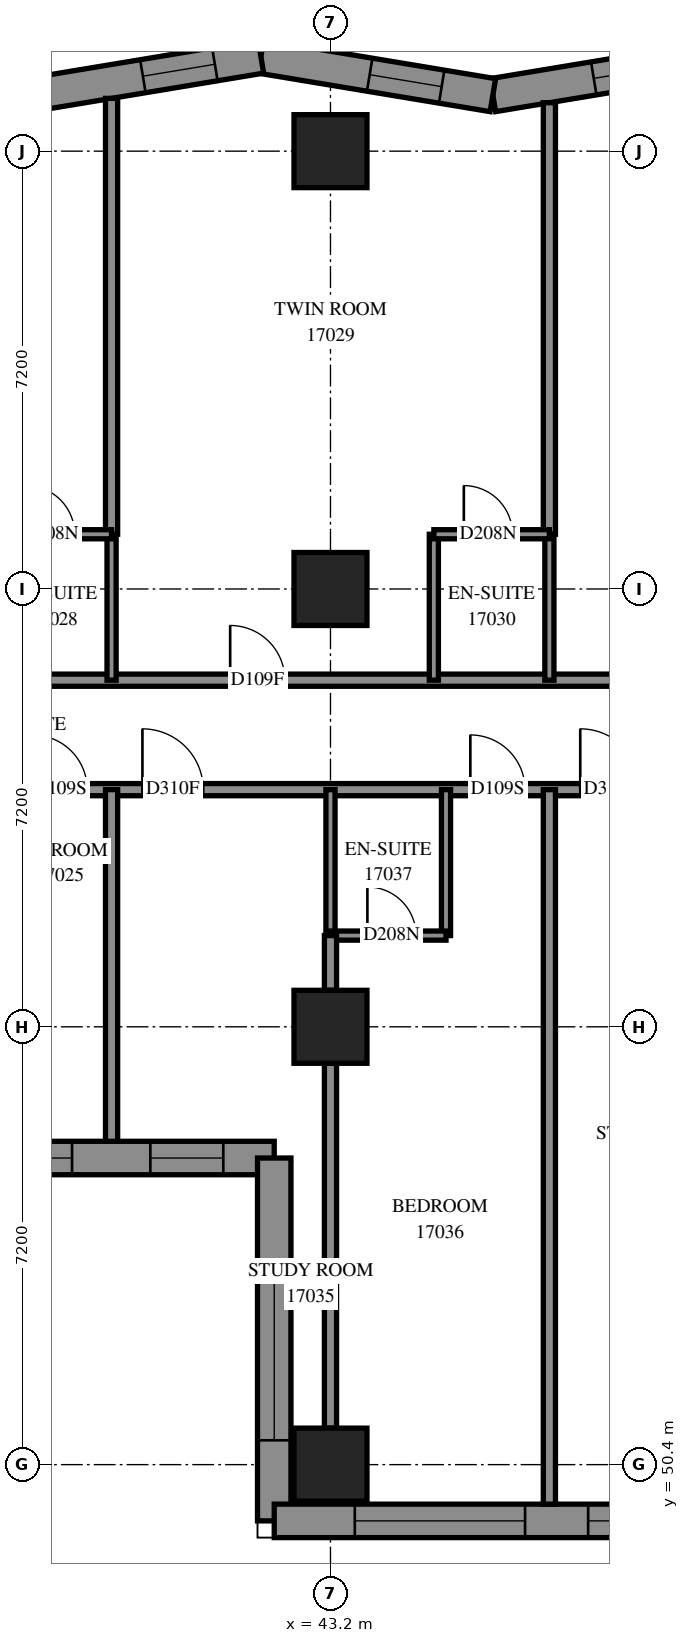
"""IFC4 building model, lengths in metres.
Left out: names, types, materials, properties, quantities, classifications, styles, units other than length and angle.
Written with IfcOpenShell. Run it as: python <this file> out.ifc"""

import sys

from ifc_helpers import new_model, si_unit, direction, frame, frame_2d, origin, origin_2d, place, context, subcontext, project, spatial, polyline, rectangle, outline, extrude, element, fill, save


model = new_model("IFC4")
c1 = context("Model", 3, precision=1e-05, world=origin(), true_north=direction((0.0, 1.0)))
c2 = subcontext(c1, "Body", "Model", "MODEL_VIEW")
j1 = project(units=[si_unit("LENGTHUNIT", "METRE"), si_unit("PLANEANGLEUNIT", "RADIAN")], contexts=[c1])
p1 = place(None, origin())
s1 = spatial("IfcSite", under=j1, at=p1, CompositionType="ELEMENT")
p2 = place(p1, origin())
s2 = spatial("IfcBuilding", under=s1, at=p2, CompositionType="ELEMENT")
p3 = place(p2, frame((0.0, 0.0, 64.4)))
s3 = spatial("IfcBuildingStorey", under=s2, at=p3, CompositionType="ELEMENT", Elevation=64.4)
for number, where, z_axis, x_axis in (
    (1, (43.2, 50.4, 0.0), (0.0, 0.0, 1.0), (1.0, 0.0, 0.0)),
    (2, (43.2, 57.6, 0.0), (0.0, 0.0, 1.0), (1.0, 0.0, 0.0)),
    (3, (43.2, 64.8, 0.0), (0.0, 0.0, 1.0), (1.0, 0.0, 0.0)),
    (4, (43.2, 72.0, 0.0), (0.0, 0.0, 1.0), (1.0, 0.0, 0.0)),
):
    element("IfcColumn", number, at=place(p3, frame(where, z_axis=z_axis, x_axis=x_axis)), inside=s3, PredefinedType="COLUMN", context=c2, shape_type="SweptSolid", body=[
        extrude(rectangle(XDim=1.2, YDim=1.2, at=origin_2d()), origin(), (0.0, 0.0, 1.0), 3.1),
    ])
p4 = place(p3, frame((49.685, 73.554, 0.0), z_axis=(0.0, 0.0, 1.0), x_axis=(-0.9865110911, -0.1636944324, 0.0)))
e5 = element("IfcWall", 5, at=p4, inside=s3, PredefinedType="SOLIDWALL", context=c2, shape_type="SweptSolid", body=[
    extrude(outline(polyline([(-0.046, -0.275), (3.821, -0.275), (3.913, 0.275), (0.046, 0.275), (-0.046, -0.275)])), origin(), (0.0, 0.0, 1.0), 3.1),
])
p5 = place(p4, frame((0.985, 0.0, 0.5)))
e6 = element("IfcOpeningElement", 6, at=p5, cuts=e5, PredefinedType="OPENING", context=c2, shape_type="SweptSolid", body=[
    extrude(rectangle(XDim=1.2, YDim=2.45, at=frame_2d((0.6, 1.225))), frame((0.0, 0.285, 0.0), z_axis=(0.0, -1.0, 0.0), x_axis=(1.0, 0.0, 0.0)), (0.0, 0.0, 1.0), 0.57),
])
p6 = place(p3, frame((45.87, 72.921, 0.0), z_axis=(0.0, 0.0, 1.0), x_axis=(-0.9865110911, 0.1636944324, 0.0)))
e7 = element("IfcWall", 7, at=p6, inside=s3, PredefinedType="SOLIDWALL", context=c2, shape_type="SweptSolid", body=[
    extrude(outline(polyline([(0.046, -0.275), (3.913, -0.275), (3.821, 0.275), (-0.046, 0.275), (0.046, -0.275)])), origin(), (0.0, 0.0, 1.0), 3.1),
])
p7 = place(p6, frame((0.854, 0.0, 0.5)))
e8 = element("IfcOpeningElement", 8, at=p7, cuts=e7, PredefinedType="OPENING", context=c2, shape_type="SweptSolid", body=[
    extrude(rectangle(XDim=1.2, YDim=2.45, at=frame_2d((0.6, 1.225))), frame((0.0, 0.285, 0.0), z_axis=(0.0, -1.0, 0.0), x_axis=(1.0, 0.0, 0.0)), (0.0, 0.0, 1.0), 0.57),
])
p8 = place(p3, frame((42.056, 73.554, 0.0), z_axis=(0.0, 0.0, 1.0), x_axis=(-0.9865110911, -0.1636944324, 0.0)))
e9 = element("IfcWall", 9, at=p8, inside=s3, PredefinedType="SOLIDWALL", context=c2, shape_type="SweptSolid", body=[
    extrude(outline(polyline([(-0.046, -0.275), (3.821, -0.275), (3.913, 0.275), (0.046, 0.275), (-0.046, -0.275)])), origin(), (0.0, 0.0, 1.0), 3.1),
])
p9 = place(p8, frame((0.767, 0.0, 0.5)))
e10 = element("IfcOpeningElement", 10, at=p9, cuts=e9, PredefinedType="OPENING", context=c2, shape_type="SweptSolid", body=[
    extrude(rectangle(XDim=1.2, YDim=2.45, at=frame_2d((0.6, 1.225))), frame((0.0, 0.285, 0.0), z_axis=(0.0, -1.0, 0.0), x_axis=(1.0, 0.0, 0.0)), (0.0, 0.0, 1.0), 0.57),
])
p10 = place(p3, frame((27.875, 55.442, 0.0), z_axis=(0.0, 0.0, 1.0), x_axis=(1.0, 0.0, 0.0)))
e11 = element("IfcWall", 11, at=p10, inside=s3, PredefinedType="SOLIDWALL", context=c2, shape_type="SweptSolid", body=[
    extrude(outline(polyline([(-0.275, -0.275), (14.125, -0.275), (14.675, 0.275), (0.275, 0.275), (-0.275, -0.275)])), origin(), (0.0, 0.0, 1.0), 3.1),
])
p11 = place(p10, frame((1.325, 0.0, 0.5)))
e12 = element("IfcOpeningElement", 12, at=p11, cuts=e11, PredefinedType="OPENING", context=c2, shape_type="SweptSolid", body=[
    extrude(rectangle(XDim=2.8, YDim=2.45, at=frame_2d((1.4, 1.225))), frame((0.0, 0.285, 0.0), z_axis=(0.0, -1.0, 0.0), x_axis=(1.0, 0.0, 0.0)), (0.0, 0.0, 1.0), 0.57),
])
p12 = place(p10, frame((4.925, 0.0, 0.5)))
e13 = element("IfcOpeningElement", 13, at=p12, cuts=e11, PredefinedType="OPENING", context=c2, shape_type="SweptSolid", body=[
    extrude(rectangle(XDim=2.8, YDim=2.45, at=frame_2d((1.4, 1.225))), frame((0.0, 0.285, 0.0), z_axis=(0.0, -1.0, 0.0), x_axis=(1.0, 0.0, 0.0)), (0.0, 0.0, 1.0), 0.57),
])
p13 = place(p10, frame((8.275, 0.0, 0.5)))
e14 = element("IfcOpeningElement", 14, at=p13, cuts=e11, PredefinedType="OPENING", context=c2, shape_type="SweptSolid", body=[
    extrude(rectangle(XDim=2.8, YDim=2.45, at=frame_2d((1.4, 1.225))), frame((0.0, 0.285, 0.0), z_axis=(0.0, -1.0, 0.0), x_axis=(1.0, 0.0, 0.0)), (0.0, 0.0, 1.0), 0.57),
])
p14 = place(p10, frame((12.363, 0.0, 0.5)))
e15 = element("IfcOpeningElement", 15, at=p14, cuts=e11, PredefinedType="OPENING", context=c2, shape_type="SweptSolid", body=[
    extrude(rectangle(XDim=1.2, YDim=2.45, at=frame_2d((0.6, 1.225))), frame((0.0, 0.285, 0.0), z_axis=(0.0, -1.0, 0.0), x_axis=(1.0, 0.0, 0.0)), (0.0, 0.0, 1.0), 0.57),
])
p15 = place(p3, frame((42.275, 55.442, 0.0), z_axis=(0.0, 0.0, 1.0), x_axis=(0.0, -1.0, 0.0)))
e16 = element("IfcWall", 16, at=p15, inside=s3, PredefinedType="SOLIDWALL", context=c2, shape_type="SweptSolid", body=[
    extrude(outline(polyline([(0.275, -0.275), (6.242, -0.275), (5.692, 0.275), (-0.275, 0.275), (0.275, -0.275)])), origin(), (0.0, 0.0, 1.0), 3.1),
])
p16 = place(p15, frame((1.842, 0.0, 0.5)))
e17 = element("IfcOpeningElement", 17, at=p16, cuts=e16, PredefinedType="OPENING", context=c2, shape_type="SweptSolid", body=[
    extrude(rectangle(XDim=2.8, YDim=2.45, at=frame_2d((1.4, 1.225))), frame((0.0, 0.285, 0.0), z_axis=(0.0, -1.0, 0.0), x_axis=(1.0, 0.0, 0.0)), (0.0, 0.0, 1.0), 0.57),
])
p17 = place(p3, frame((42.275, 49.475, 0.0), z_axis=(0.0, 0.0, 1.0), x_axis=(1.0, 0.0, 0.0)))
e18 = element("IfcWall", 18, at=p17, inside=s3, PredefinedType="SOLIDWALL", context=c2, shape_type="SweptSolid", body=[
    extrude(outline(polyline([(-0.275, -0.275), (6.925, -0.275), (7.475, 0.275), (0.275, 0.275), (-0.275, -0.275)])), origin(), (0.0, 0.0, 1.0), 3.1),
])
p18 = place(p17, frame((1.325, 0.0, 0.5)))
e19 = element("IfcOpeningElement", 19, at=p18, cuts=e18, PredefinedType="OPENING", context=c2, shape_type="SweptSolid", body=[
    extrude(rectangle(XDim=2.8, YDim=2.45, at=frame_2d((1.4, 1.225))), frame((0.0, 0.285, 0.0), z_axis=(0.0, -1.0, 0.0), x_axis=(1.0, 0.0, 0.0)), (0.0, 0.0, 1.0), 0.57),
])
p19 = place(p17, frame((5.162, 0.0, 0.5)))
e20 = element("IfcOpeningElement", 20, at=p19, cuts=e18, PredefinedType="OPENING", context=c2, shape_type="SweptSolid", body=[
    extrude(rectangle(XDim=1.2, YDim=2.45, at=frame_2d((0.6, 1.225))), frame((0.0, 0.285, 0.0), z_axis=(0.0, -1.0, 0.0), x_axis=(1.0, 0.0, 0.0)), (0.0, 0.0, 1.0), 0.57),
])
p20 = place(p3, frame((28.8, 61.5, 0.0), z_axis=(0.0, 0.0, 1.0), x_axis=(1.0, 0.0, 0.0)))
e21 = element("IfcWall", 21, at=p20, inside=s3, PredefinedType="PARTITIONING", context=c2, shape_type="SweptSolid", body=[
    extrude(rectangle(XDim=24.3, YDim=0.2, at=frame_2d((12.15, 0.0))), origin(), (0.0, 0.0, 1.0), 3.1),
])
p21 = place(p20, frame((3.899, 0.0, 0.0)))
e22 = element("IfcOpeningElement", 22, at=p21, cuts=e21, PredefinedType="OPENING", context=c2, shape_type="SweptSolid", body=[
    extrude(rectangle(XDim=0.9, YDim=2.1, at=frame_2d((0.45, 1.05))), frame((0.0, 0.11, 0.0), z_axis=(0.0, -1.0, 0.0), x_axis=(1.0, 0.0, 0.0)), (0.0, 0.0, 1.0), 0.22),
])
p22 = place(p20, frame((9.5, 0.0, 0.0)))
e23 = element("IfcOpeningElement", 23, at=p22, cuts=e21, PredefinedType="OPENING", context=c2, shape_type="SweptSolid", body=[
    extrude(rectangle(XDim=0.9, YDim=2.1, at=frame_2d((0.45, 1.05))), frame((0.0, 0.11, 0.0), z_axis=(0.0, -1.0, 0.0), x_axis=(1.0, 0.0, 0.0)), (0.0, 0.0, 1.0), 0.22),
])
p23 = place(p20, frame((11.307, 0.0, 0.0)))
e24 = element("IfcOpeningElement", 24, at=p23, cuts=e21, PredefinedType="OPENING", context=c2, shape_type="SweptSolid", body=[
    extrude(rectangle(XDim=1.0, YDim=2.1, at=frame_2d((0.5, 1.05))), frame((0.0, 0.11, 0.0), z_axis=(0.0, -1.0, 0.0), x_axis=(1.0, 0.0, 0.0)), (0.0, 0.0, 1.0), 0.22),
])
p24 = place(p20, frame((16.7, 0.0, 0.0)))
e25 = element("IfcOpeningElement", 25, at=p24, cuts=e21, PredefinedType="OPENING", context=c2, shape_type="SweptSolid", body=[
    extrude(rectangle(XDim=0.9, YDim=2.1, at=frame_2d((0.45, 1.05))), frame((0.0, 0.11, 0.0), z_axis=(0.0, -1.0, 0.0), x_axis=(1.0, 0.0, 0.0)), (0.0, 0.0, 1.0), 0.22),
])
p25 = place(p20, frame((18.508, 0.0, 0.0)))
e26 = element("IfcOpeningElement", 26, at=p25, cuts=e21, PredefinedType="OPENING", context=c2, shape_type="SweptSolid", body=[
    extrude(rectangle(XDim=1.0, YDim=2.1, at=frame_2d((0.5, 1.05))), frame((0.0, 0.11, 0.0), z_axis=(0.0, -1.0, 0.0), x_axis=(1.0, 0.0, 0.0)), (0.0, 0.0, 1.0), 0.22),
])
p26 = place(p20, frame((23.033, 0.0, 0.0)))
e27 = element("IfcOpeningElement", 27, at=p26, cuts=e21, PredefinedType="OPENING", context=c2, shape_type="SweptSolid", body=[
    extrude(rectangle(XDim=1.0, YDim=2.1, at=frame_2d((0.5, 1.05))), frame((0.0, 0.11, 0.0), z_axis=(0.0, -1.0, 0.0), x_axis=(1.0, 0.0, 0.0)), (0.0, 0.0, 1.0), 0.22),
])
p27 = place(p3, frame((33.302, 63.3, 0.0), z_axis=(0.0, 0.0, 1.0), x_axis=(1.0, 0.0, 0.0)))
e28 = element("IfcWall", 28, at=p27, inside=s3, PredefinedType="PARTITIONING", context=c2, shape_type="SweptSolid", body=[
    extrude(rectangle(XDim=21.798, YDim=0.2, at=frame_2d((10.899, 0.0))), origin(), (0.0, 0.0, 1.0), 3.1),
])
p28 = place(p27, frame((1.091, 0.0, 0.0)))
e29 = element("IfcOpeningElement", 29, at=p28, cuts=e28, PredefinedType="OPENING", context=c2, shape_type="SweptSolid", body=[
    extrude(rectangle(XDim=0.9, YDim=2.1, at=frame_2d((0.45, 1.05))), frame((0.0, 0.11, 0.0), z_axis=(0.0, -1.0, 0.0), x_axis=(1.0, 0.0, 0.0)), (0.0, 0.0, 1.0), 0.22),
])
p29 = place(p27, frame((8.248, 0.0, 0.0)))
e30 = element("IfcOpeningElement", 30, at=p29, cuts=e28, PredefinedType="OPENING", context=c2, shape_type="SweptSolid", body=[
    extrude(rectangle(XDim=0.9, YDim=2.1, at=frame_2d((0.45, 1.05))), frame((0.0, 0.11, 0.0), z_axis=(0.0, -1.0, 0.0), x_axis=(1.0, 0.0, 0.0)), (0.0, 0.0, 1.0), 0.22),
])
p30 = place(p27, frame((15.448, 0.0, 0.0)))
e31 = element("IfcOpeningElement", 31, at=p30, cuts=e28, PredefinedType="OPENING", context=c2, shape_type="SweptSolid", body=[
    extrude(rectangle(XDim=0.9, YDim=2.1, at=frame_2d((0.45, 1.05))), frame((0.0, 0.11, 0.0), z_axis=(0.0, -1.0, 0.0), x_axis=(1.0, 0.0, 0.0)), (0.0, 0.0, 1.0), 0.22),
])
p31 = place(p3, frame((46.8, 49.75, 0.0), z_axis=(0.0, 0.0, 1.0), x_axis=(0.0, 1.0, 0.0)))
e32 = element("IfcWall", 32, at=p31, inside=s3, PredefinedType="PARTITIONING", context=c2, shape_type="SweptSolid", body=[
    extrude(rectangle(XDim=11.75, YDim=0.2, at=frame_2d((5.875, 0.0))), origin(), (0.0, 0.0, 1.0), 3.1),
])
p32 = place(p3, frame((39.6, 65.7, 0.0), z_axis=(0.0, 0.0, 1.0), x_axis=(0.0, 1.0, 0.0)))
e33 = element("IfcWall", 33, at=p32, inside=s3, PredefinedType="PARTITIONING", context=c2, shape_type="SweptSolid", body=[
    extrude(rectangle(XDim=7.168, YDim=0.2, at=frame_2d((3.584, 0.0))), origin(), (0.0, 0.0, 1.0), 3.1),
])
p33 = place(p3, frame((46.8, 65.7, 0.0), z_axis=(0.0, 0.0, 1.0), x_axis=(0.0, 1.0, 0.0)))
e34 = element("IfcWall", 34, at=p33, inside=s3, PredefinedType="PARTITIONING", context=c2, shape_type="SweptSolid", body=[
    extrude(rectangle(XDim=7.097, YDim=0.2, at=frame_2d((3.548, 0.0))), origin(), (0.0, 0.0, 1.0), 3.1),
])
p34 = place(p3, frame((43.2, 51.0, 0.0), z_axis=(0.0, 0.0, 1.0), x_axis=(0.0, 1.0, 0.0)))
e35 = element("IfcWall", 35, at=p34, inside=s3, PredefinedType="PARTITIONING", context=c2, shape_type="SweptSolid", body=[
    extrude(rectangle(XDim=6.0, YDim=0.2, at=frame_2d((3.0, 0.0))), origin(), (0.0, 0.0, 1.0), 2.6),
])
p35 = place(p3, frame((39.6, 55.717, 0.0), z_axis=(0.0, 0.0, 1.0), x_axis=(0.0, 1.0, 0.0)))
e36 = element("IfcWall", 36, at=p35, inside=s3, PredefinedType="PARTITIONING", context=c2, shape_type="SweptSolid", body=[
    extrude(rectangle(XDim=5.783, YDim=0.2, at=frame_2d((2.892, 0.0))), origin(), (0.0, 0.0, 1.0), 3.1),
])
for number, where, z_axis, x_axis in (
    (37, (39.6, 63.3, 0.0), (0.0, 0.0, 1.0), (0.0, 1.0, 0.0)),
    (38, (44.9, 63.3, 0.0), (0.0, 0.0, 1.0), (0.0, 1.0, 0.0)),
    (39, (46.8, 63.3, 0.0), (0.0, 0.0, 1.0), (0.0, 1.0, 0.0)),
    (40, (45.1, 59.1, 0.0), (0.0, 0.0, 1.0), (0.0, 1.0, 0.0)),
    (41, (43.2, 59.1, 0.0), (0.0, 0.0, 1.0), (0.0, 1.0, 0.0)),
):
    element("IfcWall", number, at=place(p3, frame(where, z_axis=z_axis, x_axis=x_axis)), inside=s3, PredefinedType="PARTITIONING", context=c2, shape_type="SweptSolid", body=[
        extrude(rectangle(XDim=2.4, YDim=0.15, at=frame_2d((1.2, 0.0))), origin(), (0.0, 0.0, 1.0), 3.1),
    ])
p36 = place(p3, frame((43.2, 59.1, 0.0), z_axis=(0.0, 0.0, 1.0), x_axis=(1.0, 0.0, 0.0)))
e42 = element("IfcWall", 42, at=p36, inside=s3, PredefinedType="PARTITIONING", context=c2, shape_type="SweptSolid", body=[
    extrude(rectangle(XDim=1.9, YDim=0.15, at=frame_2d((0.95, 0.0))), origin(), (0.0, 0.0, 1.0), 3.1),
])
p37 = place(p36, frame((0.607, 0.0, 0.0)))
e43 = element("IfcOpeningElement", 43, at=p37, cuts=e42, PredefinedType="OPENING", context=c2, shape_type="SweptSolid", body=[
    extrude(rectangle(XDim=0.8, YDim=2.1, at=frame_2d((0.4, 1.05))), frame((0.0, 0.085, 0.0), z_axis=(0.0, -1.0, 0.0), x_axis=(1.0, 0.0, 0.0)), (0.0, 0.0, 1.0), 0.17),
])
p38 = place(p3, frame((37.7, 65.7, 0.0), z_axis=(0.0, 0.0, 1.0), x_axis=(1.0, 0.0, 0.0)))
e44 = element("IfcWall", 44, at=p38, inside=s3, PredefinedType="PARTITIONING", context=c2, shape_type="SweptSolid", body=[
    extrude(rectangle(XDim=1.9, YDim=0.15, at=frame_2d((0.95, 0.0))), origin(), (0.0, 0.0, 1.0), 3.1),
])
p39 = place(p38, frame((0.493, 0.0, 0.0)))
e45 = element("IfcOpeningElement", 45, at=p39, cuts=e44, PredefinedType="OPENING", context=c2, shape_type="SweptSolid", body=[
    extrude(rectangle(XDim=0.8, YDim=2.1, at=frame_2d((0.4, 1.05))), frame((0.0, 0.085, 0.0), z_axis=(0.0, -1.0, 0.0), x_axis=(1.0, 0.0, 0.0)), (0.0, 0.0, 1.0), 0.17),
])
p40 = place(p3, frame((44.9, 65.7, 0.0), z_axis=(0.0, 0.0, 1.0), x_axis=(1.0, 0.0, 0.0)))
e46 = element("IfcWall", 46, at=p40, inside=s3, PredefinedType="PARTITIONING", context=c2, shape_type="SweptSolid", body=[
    extrude(rectangle(XDim=1.9, YDim=0.15, at=frame_2d((0.95, 0.0))), origin(), (0.0, 0.0, 1.0), 3.1),
])
p41 = place(p40, frame((0.493, 0.0, 0.0)))
e47 = element("IfcOpeningElement", 47, at=p41, cuts=e46, PredefinedType="OPENING", context=c2, shape_type="SweptSolid", body=[
    extrude(rectangle(XDim=0.8, YDim=2.1, at=frame_2d((0.4, 1.05))), frame((0.0, 0.085, 0.0), z_axis=(0.0, -1.0, 0.0), x_axis=(1.0, 0.0, 0.0)), (0.0, 0.0, 1.0), 0.17),
])
p42 = place(p3, frame((43.2, 58.2, 0.0), z_axis=(0.0, 0.0, 1.0), x_axis=(0.0, 1.0, 0.0)))
e48 = element("IfcWall", 48, at=p42, inside=s3, PredefinedType="PARTITIONING", context=c2, shape_type="SweptSolid", body=[
    extrude(rectangle(XDim=0.9, YDim=0.2, at=frame_2d((0.45, 0.0))), origin(), (0.0, 0.0, 1.0), 3.1),
])
p43 = place(p5, origin())
e49 = element("IfcWindow", 49, at=p43, inside=s3, PartitioningType="SINGLE_PANEL", PredefinedType="WINDOW", context=c2, shape_type="SweptSolid", body=[
    extrude(rectangle(XDim=1.2, YDim=2.45, at=frame_2d((0.6, 1.225))), frame((0.0, 0.155, 0.0), z_axis=(0.0, -1.0, 0.0), x_axis=(1.0, 0.0, 0.0)), (0.0, 0.0, 1.0), 0.06),
])
fill(e6, e49)
p44 = place(p7, origin())
e50 = element("IfcWindow", 50, at=p44, inside=s3, PartitioningType="SINGLE_PANEL", PredefinedType="WINDOW", context=c2, shape_type="SweptSolid", body=[
    extrude(rectangle(XDim=1.2, YDim=2.45, at=frame_2d((0.6, 1.225))), frame((0.0, 0.155, 0.0), z_axis=(0.0, -1.0, 0.0), x_axis=(1.0, 0.0, 0.0)), (0.0, 0.0, 1.0), 0.06),
])
fill(e8, e50)
p45 = place(p9, origin())
e51 = element("IfcWindow", 51, at=p45, inside=s3, PartitioningType="SINGLE_PANEL", PredefinedType="WINDOW", context=c2, shape_type="SweptSolid", body=[
    extrude(rectangle(XDim=1.2, YDim=2.45, at=frame_2d((0.6, 1.225))), frame((0.0, 0.155, 0.0), z_axis=(0.0, -1.0, 0.0), x_axis=(1.0, 0.0, 0.0)), (0.0, 0.0, 1.0), 0.06),
])
fill(e10, e51)
p46 = place(p13, origin())
e52 = element("IfcWindow", 52, at=p46, inside=s3, PartitioningType="SINGLE_PANEL", PredefinedType="WINDOW", context=c2, shape_type="SweptSolid", body=[
    extrude(rectangle(XDim=2.8, YDim=2.45, at=frame_2d((1.4, 1.225))), frame((0.0, 0.155, 0.0), z_axis=(0.0, -1.0, 0.0), x_axis=(1.0, 0.0, 0.0)), (0.0, 0.0, 1.0), 0.06),
])
fill(e14, e52)
p47 = place(p14, origin())
e53 = element("IfcWindow", 53, at=p47, inside=s3, PartitioningType="SINGLE_PANEL", PredefinedType="WINDOW", context=c2, shape_type="SweptSolid", body=[
    extrude(rectangle(XDim=1.2, YDim=2.45, at=frame_2d((0.6, 1.225))), frame((0.0, 0.155, 0.0), z_axis=(0.0, -1.0, 0.0), x_axis=(1.0, 0.0, 0.0)), (0.0, 0.0, 1.0), 0.06),
])
fill(e15, e53)
p48 = place(p16, origin())
e54 = element("IfcWindow", 54, at=p48, inside=s3, PartitioningType="SINGLE_PANEL", PredefinedType="WINDOW", context=c2, shape_type="SweptSolid", body=[
    extrude(rectangle(XDim=2.8, YDim=2.45, at=frame_2d((1.4, 1.225))), frame((0.0, 0.155, 0.0), z_axis=(0.0, -1.0, 0.0), x_axis=(1.0, 0.0, 0.0)), (0.0, 0.0, 1.0), 0.06),
])
fill(e17, e54)
p49 = place(p18, origin())
e55 = element("IfcWindow", 55, at=p49, inside=s3, PartitioningType="SINGLE_PANEL", PredefinedType="WINDOW", context=c2, shape_type="SweptSolid", body=[
    extrude(rectangle(XDim=2.8, YDim=2.45, at=frame_2d((1.4, 1.225))), frame((0.0, 0.155, 0.0), z_axis=(0.0, -1.0, 0.0), x_axis=(1.0, 0.0, 0.0)), (0.0, 0.0, 1.0), 0.06),
])
fill(e19, e55)
p50 = place(p19, origin())
e56 = element("IfcWindow", 56, at=p50, inside=s3, PartitioningType="SINGLE_PANEL", PredefinedType="WINDOW", context=c2, shape_type="SweptSolid", body=[
    extrude(rectangle(XDim=1.2, YDim=2.45, at=frame_2d((0.6, 1.225))), frame((0.0, 0.155, 0.0), z_axis=(0.0, -1.0, 0.0), x_axis=(1.0, 0.0, 0.0)), (0.0, 0.0, 1.0), 0.06),
])
fill(e20, e56)
p51 = place(p22, origin())
e57 = element("IfcDoor", 57, at=p51, inside=s3, OperationType="SINGLE_SWING_LEFT", PredefinedType="DOOR", context=c2, shape_type="SweptSolid", body=[
    extrude(rectangle(XDim=0.9, YDim=2.1, at=frame_2d((0.45, 1.05))), frame((0.0, 0.025, 0.0), z_axis=(0.0, -1.0, 0.0), x_axis=(1.0, 0.0, 0.0)), (0.0, 0.0, 1.0), 0.05),
])
fill(e23, e57)
p52 = place(p39, origin())
e58 = element("IfcDoor", 58, at=p52, inside=s3, OperationType="SINGLE_SWING_RIGHT", PredefinedType="DOOR", context=c2, shape_type="SweptSolid", body=[
    extrude(rectangle(XDim=0.8, YDim=2.1, at=frame_2d((0.4, 1.05))), frame((0.0, 0.025, 0.0), z_axis=(0.0, -1.0, 0.0), x_axis=(1.0, 0.0, 0.0)), (0.0, 0.0, 1.0), 0.05),
])
fill(e45, e58)
p53 = place(p29, origin())
e59 = element("IfcDoor", 59, at=p53, inside=s3, OperationType="SINGLE_SWING_LEFT", PredefinedType="DOOR", context=c2, shape_type="SweptSolid", body=[
    extrude(rectangle(XDim=0.9, YDim=2.1, at=frame_2d((0.45, 1.05))), frame((0.0, 0.025, 0.0), z_axis=(0.0, -1.0, 0.0), x_axis=(1.0, 0.0, 0.0)), (0.0, 0.0, 1.0), 0.05),
])
fill(e30, e59)
p54 = place(p41, origin())
e60 = element("IfcDoor", 60, at=p54, inside=s3, OperationType="SINGLE_SWING_RIGHT", PredefinedType="DOOR", context=c2, shape_type="SweptSolid", body=[
    extrude(rectangle(XDim=0.8, YDim=2.1, at=frame_2d((0.4, 1.05))), frame((0.0, 0.025, 0.0), z_axis=(0.0, -1.0, 0.0), x_axis=(1.0, 0.0, 0.0)), (0.0, 0.0, 1.0), 0.05),
])
fill(e47, e60)
p55 = place(p23, origin())
e61 = element("IfcDoor", 61, at=p55, inside=s3, OperationType="SINGLE_SWING_RIGHT", PredefinedType="DOOR", context=c2, shape_type="SweptSolid", body=[
    extrude(rectangle(XDim=1.0, YDim=2.1, at=frame_2d((0.5, 1.05))), frame((0.0, 0.025, 0.0), z_axis=(0.0, -1.0, 0.0), x_axis=(1.0, 0.0, 0.0)), (0.0, 0.0, 1.0), 0.05),
])
fill(e24, e61)
p56 = place(p24, origin())
e62 = element("IfcDoor", 62, at=p56, inside=s3, OperationType="SINGLE_SWING_LEFT", PredefinedType="DOOR", context=c2, shape_type="SweptSolid", body=[
    extrude(rectangle(XDim=0.9, YDim=2.1, at=frame_2d((0.45, 1.05))), frame((0.0, 0.025, 0.0), z_axis=(0.0, -1.0, 0.0), x_axis=(1.0, 0.0, 0.0)), (0.0, 0.0, 1.0), 0.05),
])
fill(e25, e62)
p57 = place(p37, origin())
e63 = element("IfcDoor", 63, at=p57, inside=s3, OperationType="SINGLE_SWING_RIGHT", PredefinedType="DOOR", context=c2, shape_type="SweptSolid", body=[
    extrude(rectangle(XDim=0.8, YDim=2.1, at=frame_2d((0.4, 1.05))), frame((0.0, 0.025, 0.0), z_axis=(0.0, -1.0, 0.0), x_axis=(1.0, 0.0, 0.0)), (0.0, 0.0, 1.0), 0.05),
])
fill(e43, e63)
p58 = place(p25, origin())
e64 = element("IfcDoor", 64, at=p58, inside=s3, OperationType="SINGLE_SWING_RIGHT", PredefinedType="DOOR", context=c2, shape_type="SweptSolid", body=[
    extrude(rectangle(XDim=1.0, YDim=2.1, at=frame_2d((0.5, 1.05))), frame((0.0, 0.025, 0.0), z_axis=(0.0, -1.0, 0.0), x_axis=(1.0, 0.0, 0.0)), (0.0, 0.0, 1.0), 0.05),
])
fill(e26, e64)
save(model, sys.argv[1])
